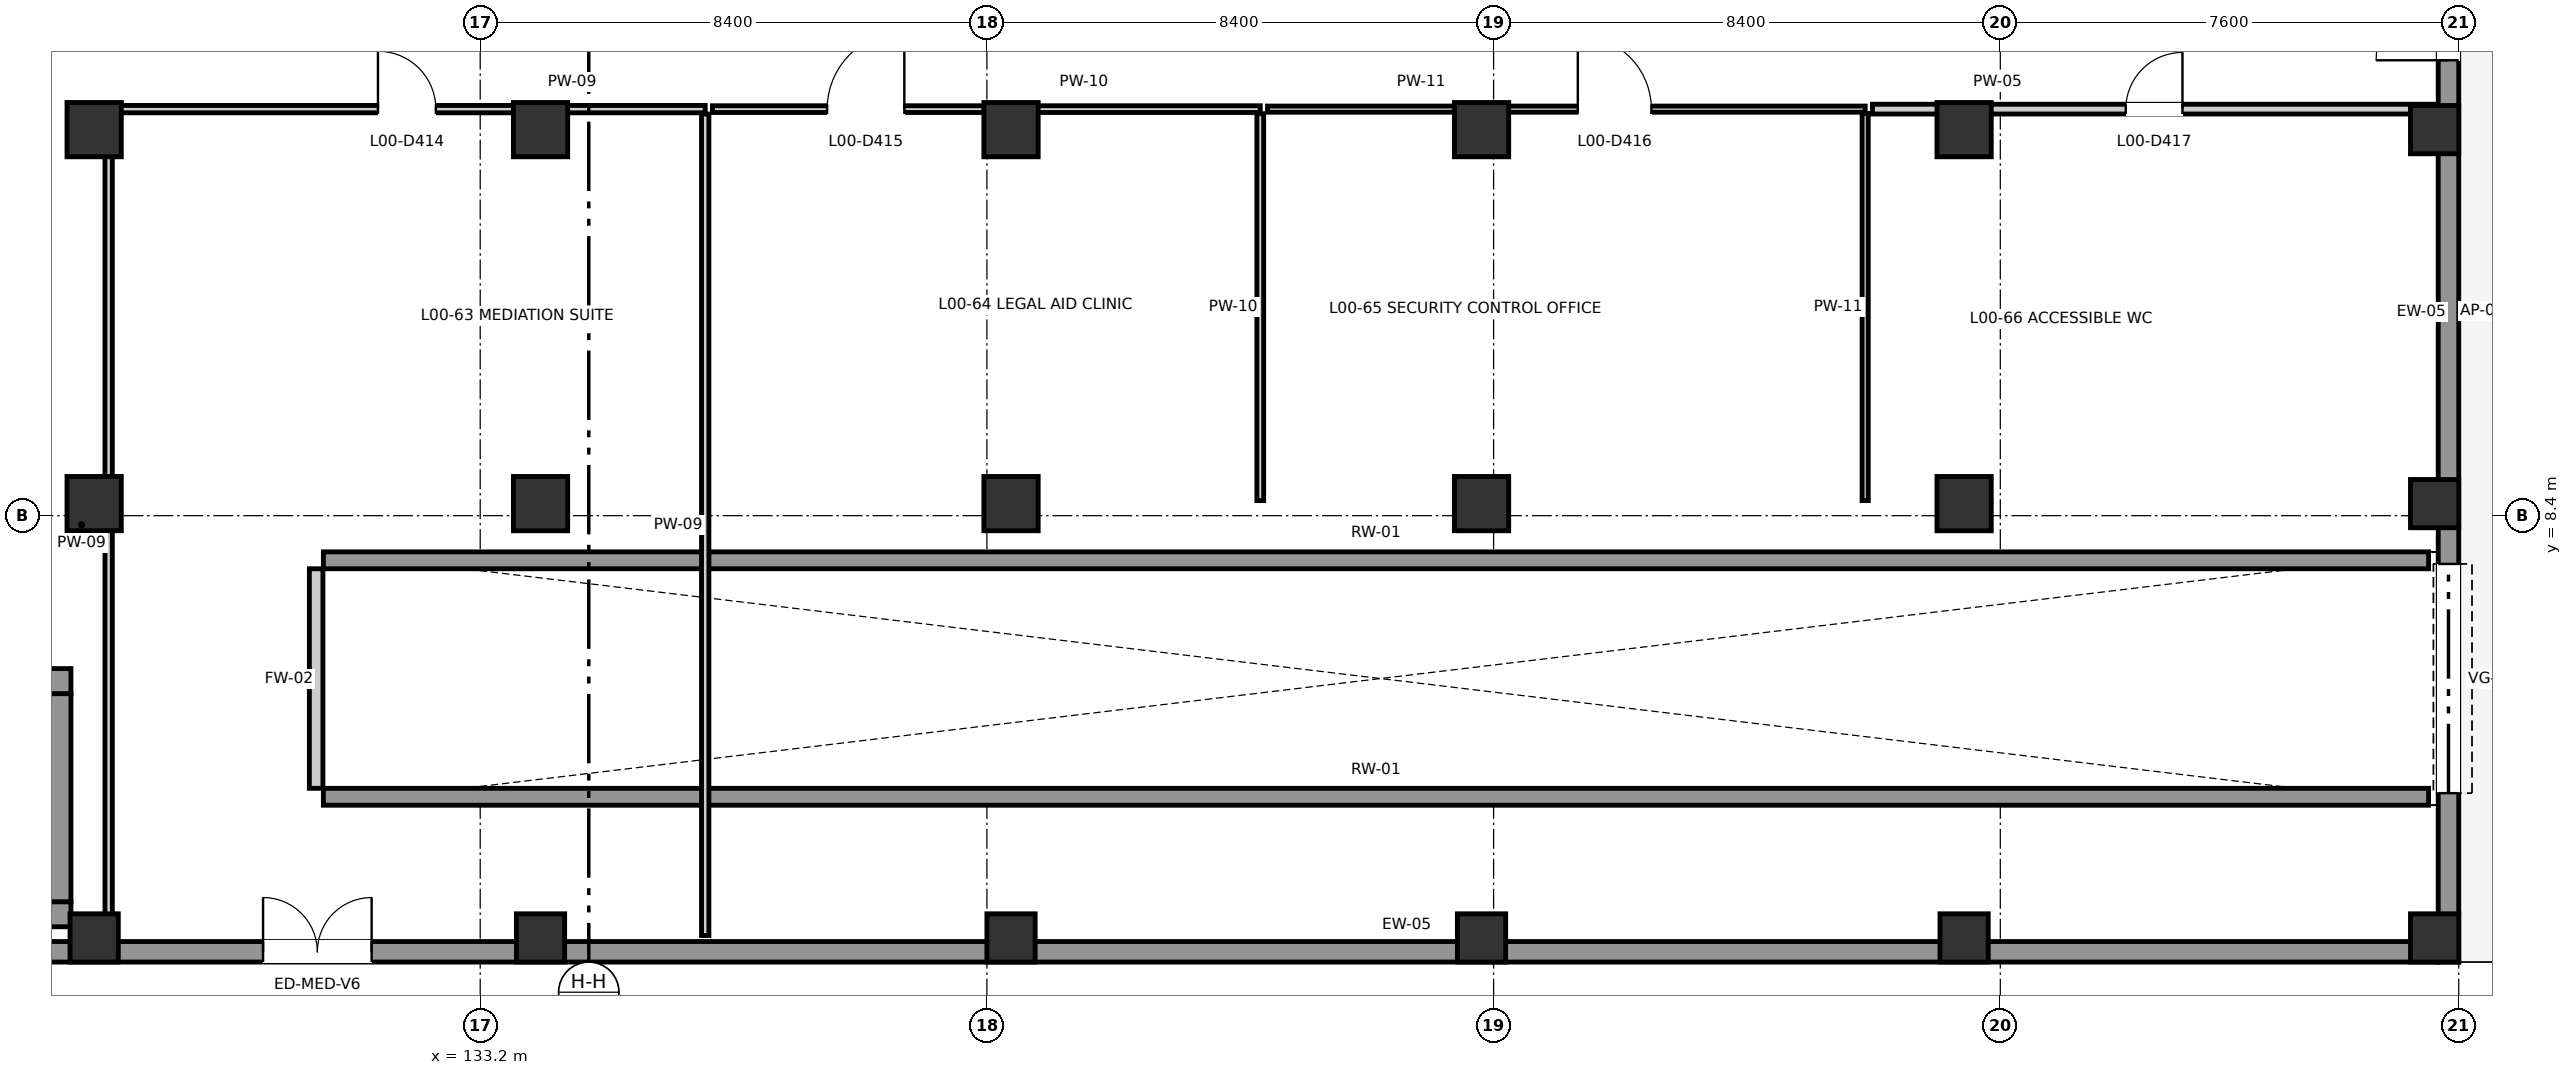
"""IFC4 building model, lengths in metres.
Left out: names, types, materials, properties, quantities, classifications, styles, units other than length and angle.
Written with IfcOpenShell. Run it as: python <this file> out.ifc"""

import sys

from ifc_helpers import new_model, si_unit, direction, frame, frame_2d, origin, origin_2d, place, context, subcontext, project, spatial, rectangle, extrude, element, fill, save


model = new_model("IFC4")
c1 = context("Model", 3, precision=1e-05, world=origin(), true_north=direction((0.0, 1.0)))
c2 = subcontext(c1, "Body", "Model", "MODEL_VIEW")
j1 = project(units=[si_unit("LENGTHUNIT", "METRE"), si_unit("PLANEANGLEUNIT", "RADIAN")], contexts=[c1])
p1 = place(None, origin())
s1 = spatial("IfcSite", under=j1, at=p1, CompositionType="ELEMENT")
p2 = place(p1, origin())
s2 = spatial("IfcBuilding", under=s1, at=p2, CompositionType="ELEMENT")
p3 = place(p2, origin())
s3 = spatial("IfcBuildingStorey", under=s2, at=p3, CompositionType="ELEMENT", Elevation=0.0)
p4 = place(p3, frame((126.8, 1.4, 0.0), z_axis=(0.0, 0.0, 1.0), x_axis=(1.0, 0.0, 0.0)))
e1 = element("IfcColumn", 1, at=p4, inside=s3, PredefinedType="COLUMN", context=c2, shape_type="SweptSolid", body=[
    extrude(rectangle(XDim=0.8, YDim=0.8, at=origin_2d()), origin(), (0.0, 0.0, 1.0), 5.4),
])
for number, where, z_axis, x_axis in (
    (2, (126.8, 8.6, 0.0), (0.0, 0.0, 1.0), (1.0, 0.0, 0.0)),
    (3, (126.8, 14.8, 0.0), (0.0, 0.0, 1.0), (1.0, 0.0, 0.0)),
):
    element("IfcColumn", number, at=place(p3, frame(where, z_axis=z_axis, x_axis=x_axis)), inside=s3, PredefinedType="COLUMN", context=c2, shape_type="SweptSolid", body=[
        extrude(rectangle(XDim=0.9, YDim=0.9, at=origin_2d()), origin(), (0.0, 0.0, 1.0), 5.4),
    ])
p5 = place(p3, frame((134.2, 1.4, 0.0), z_axis=(0.0, 0.0, 1.0), x_axis=(1.0, 0.0, 0.0)))
e4 = element("IfcColumn", 4, at=p5, inside=s3, PredefinedType="COLUMN", context=c2, shape_type="SweptSolid", body=[
    extrude(rectangle(XDim=0.8, YDim=0.8, at=origin_2d()), origin(), (0.0, 0.0, 1.0), 5.4),
])
for number, where, z_axis, x_axis in (
    (5, (134.2, 8.6, 0.0), (0.0, 0.0, 1.0), (1.0, 0.0, 0.0)),
    (6, (134.2, 14.8, 0.0), (0.0, 0.0, 1.0), (1.0, 0.0, 0.0)),
):
    element("IfcColumn", number, at=place(p3, frame(where, z_axis=z_axis, x_axis=x_axis)), inside=s3, PredefinedType="COLUMN", context=c2, shape_type="SweptSolid", body=[
        extrude(rectangle(XDim=0.9, YDim=0.9, at=origin_2d()), origin(), (0.0, 0.0, 1.0), 5.4),
    ])
p6 = place(p3, frame((142.0, 1.4, 0.0), z_axis=(0.0, 0.0, 1.0), x_axis=(1.0, 0.0, 0.0)))
e7 = element("IfcColumn", 7, at=p6, inside=s3, PredefinedType="COLUMN", context=c2, shape_type="SweptSolid", body=[
    extrude(rectangle(XDim=0.8, YDim=0.8, at=origin_2d()), origin(), (0.0, 0.0, 1.0), 5.4),
])
for number, where, z_axis, x_axis in (
    (8, (142.0, 8.6, 0.0), (0.0, 0.0, 1.0), (1.0, 0.0, 0.0)),
    (9, (142.0, 14.8, 0.0), (0.0, 0.0, 1.0), (1.0, 0.0, 0.0)),
):
    element("IfcColumn", number, at=place(p3, frame(where, z_axis=z_axis, x_axis=x_axis)), inside=s3, PredefinedType="COLUMN", context=c2, shape_type="SweptSolid", body=[
        extrude(rectangle(XDim=0.9, YDim=0.9, at=origin_2d()), origin(), (0.0, 0.0, 1.0), 5.4),
    ])
p7 = place(p3, frame((149.8, 1.4, 0.0), z_axis=(0.0, 0.0, 1.0), x_axis=(1.0, 0.0, 0.0)))
e10 = element("IfcColumn", 10, at=p7, inside=s3, PredefinedType="COLUMN", context=c2, shape_type="SweptSolid", body=[
    extrude(rectangle(XDim=0.8, YDim=0.8, at=origin_2d()), origin(), (0.0, 0.0, 1.0), 5.4),
])
for number, where, z_axis, x_axis in (
    (11, (149.8, 8.6, 0.0), (0.0, 0.0, 1.0), (1.0, 0.0, 0.0)),
    (12, (149.8, 14.8, 0.0), (0.0, 0.0, 1.0), (1.0, 0.0, 0.0)),
):
    element("IfcColumn", number, at=place(p3, frame(where, z_axis=z_axis, x_axis=x_axis)), inside=s3, PredefinedType="COLUMN", context=c2, shape_type="SweptSolid", body=[
        extrude(rectangle(XDim=0.9, YDim=0.9, at=origin_2d()), origin(), (0.0, 0.0, 1.0), 5.4),
    ])
p8 = place(p3, frame((157.8, 1.4, 0.0), z_axis=(0.0, 0.0, 1.0), x_axis=(1.0, 0.0, 0.0)))
e13 = element("IfcColumn", 13, at=p8, inside=s3, PredefinedType="COLUMN", context=c2, shape_type="SweptSolid", body=[
    extrude(rectangle(XDim=0.8, YDim=0.8, at=origin_2d()), origin(), (0.0, 0.0, 1.0), 5.4),
])
for number, where, z_axis, x_axis in (
    (14, (157.8, 8.6, 0.0), (0.0, 0.0, 1.0), (1.0, 0.0, 0.0)),
    (15, (157.8, 14.8, 0.0), (0.0, 0.0, 1.0), (1.0, 0.0, 0.0)),
):
    element("IfcColumn", number, at=place(p3, frame(where, z_axis=z_axis, x_axis=x_axis)), inside=s3, PredefinedType="COLUMN", context=c2, shape_type="SweptSolid", body=[
        extrude(rectangle(XDim=0.9, YDim=0.9, at=origin_2d()), origin(), (0.0, 0.0, 1.0), 5.4),
    ])
for number, where, z_axis, x_axis in (
    (16, (165.6, 1.4, 0.0), (0.0, 0.0, 1.0), (1.0, 0.0, 0.0)),
    (17, (165.6, 8.6, 0.0), (0.0, 0.0, 1.0), (1.0, 0.0, 0.0)),
    (18, (165.6, 14.8, 0.0), (0.0, 0.0, 1.0), (1.0, 0.0, 0.0)),
):
    element("IfcColumn", number, at=place(p3, frame(where, z_axis=z_axis, x_axis=x_axis)), inside=s3, PredefinedType="COLUMN", context=c2, shape_type="SweptSolid", body=[
        extrude(rectangle(XDim=0.8, YDim=0.8, at=origin_2d()), origin(), (0.0, 0.0, 1.0), 5.4),
    ])
p9 = place(p3, frame((101.755, 1.17, 0.0), z_axis=(0.0, 0.0, 1.0), x_axis=(1.0, 0.0, 0.0)))
e19 = element("IfcWall", 19, at=p9, inside=s3, PredefinedType="SOLIDWALL", context=c2, shape_type="SweptSolid", body=[
    extrude(rectangle(XDim=63.91, YDim=0.34, at=frame_2d((31.955, 0.0))), origin(), (0.0, 0.0, 1.0), 5.1),
])
p10 = place(p9, frame((3.245, 0.0, 0.0)))
e20 = element("IfcOpeningElement", 20, at=p10, cuts=e19, PredefinedType="OPENING", context=c2, shape_type="SweptSolid", body=[
    extrude(rectangle(XDim=1.6, YDim=2.26, at=frame_2d((0.8, 1.13))), frame((0.0, 0.185, 0.0), z_axis=(0.0, -1.0, 0.0), x_axis=(1.0, 0.0, 0.0)), (0.0, 0.0, 1.0), 0.37),
])
p11 = place(p9, frame((9.445, 0.0, 0.0)))
e21 = element("IfcOpeningElement", 21, at=p11, cuts=e19, PredefinedType="OPENING", context=c2, shape_type="SweptSolid", body=[
    extrude(rectangle(XDim=1.8, YDim=2.38, at=frame_2d((0.9, 1.19))), frame((0.0, 0.185, 0.0), z_axis=(0.0, -1.0, 0.0), x_axis=(1.0, 0.0, 0.0)), (0.0, 0.0, 1.0), 0.37),
])
p12 = place(p9, frame((13.695, 0.0, 0.0)))
e22 = element("IfcOpeningElement", 22, at=p12, cuts=e19, PredefinedType="OPENING", context=c2, shape_type="SweptSolid", body=[
    extrude(rectangle(XDim=1.2, YDim=2.2, at=frame_2d((0.6, 1.1))), frame((0.0, 0.185, 0.0), z_axis=(0.0, -1.0, 0.0), x_axis=(1.0, 0.0, 0.0)), (0.0, 0.0, 1.0), 0.37),
])
p13 = place(p9, frame((27.845, 0.0, 0.0)))
e23 = element("IfcOpeningElement", 23, at=p13, cuts=e19, PredefinedType="OPENING", context=c2, shape_type="SweptSolid", body=[
    extrude(rectangle(XDim=1.8, YDim=2.38, at=frame_2d((0.9, 1.19))), frame((0.0, 0.185, 0.0), z_axis=(0.0, -1.0, 0.0), x_axis=(1.0, 0.0, 0.0)), (0.0, 0.0, 1.0), 0.37),
])
p14 = place(p3, frame((165.83, 1.0, 0.0), z_axis=(0.0, 0.0, 1.0), x_axis=(0.0, 1.0, 0.0)))
e24 = element("IfcWall", 24, at=p14, inside=s3, PredefinedType="SOLIDWALL", context=c2, shape_type="SweptSolid", body=[
    extrude(rectangle(XDim=21.6, YDim=0.34, at=frame_2d((10.8, 0.0))), origin(), (0.0, 0.0, 1.0), 5.1),
])
p15 = place(p14, frame((16.8, 0.0, 0.0)))
e25 = element("IfcOpeningElement", 25, at=p15, cuts=e24, PredefinedType="OPENING", context=c2, shape_type="SweptSolid", body=[
    extrude(rectangle(XDim=3.6, YDim=3.0, at=frame_2d((1.8, 1.5))), frame((0.0, 0.185, 0.0), z_axis=(0.0, -1.0, 0.0), x_axis=(1.0, 0.0, 0.0)), (0.0, 0.0, 1.0), 0.37),
])
p16 = place(p14, frame((2.8, 0.0, 0.0)))
e26 = element("IfcOpeningElement", 26, at=p16, cuts=e24, PredefinedType="OPENING", context=c2, shape_type="SweptSolid", body=[
    extrude(rectangle(XDim=3.8, YDim=3.6, at=frame_2d((1.9, 1.8))), frame((0.0, 0.185, 0.0), z_axis=(0.0, -1.0, 0.0), x_axis=(1.0, 0.0, 0.0)), (0.0, 0.0, 1.0), 0.37),
])
p17 = place(p14, frame((14.95, 0.0, 0.0)))
e27 = element("IfcOpeningElement", 27, at=p17, cuts=e24, PredefinedType="OPENING", context=c2, shape_type="SweptSolid", body=[
    extrude(rectangle(XDim=1.2, YDim=2.2, at=frame_2d((0.6, 1.1))), frame((0.0, 0.185, 0.0), z_axis=(0.0, -1.0, 0.0), x_axis=(1.0, 0.0, 0.0)), (0.0, 0.0, 1.0), 0.37),
])
p18 = place(p3, frame((117.985, 1.792, 0.0), z_axis=(0.0, 0.0, 1.0), x_axis=(1.0, 0.0, 0.0)))
e28 = element("IfcWall", 28, at=p18, inside=s3, PredefinedType="SHEAR", context=c2, shape_type="SweptSolid", body=[
    extrude(rectangle(XDim=8.43, YDim=0.415, at=frame_2d((4.215, 0.0))), origin(), (0.0, 0.0, 1.0), 5.4),
])
p19 = place(p3, frame((126.208, 2.0, 0.0), z_axis=(0.0, 0.0, 1.0), x_axis=(0.0, 1.0, 0.0)))
e29 = element("IfcWall", 29, at=p19, inside=s3, PredefinedType="SHEAR", context=c2, shape_type="SweptSolid", body=[
    extrude(rectangle(XDim=3.45, YDim=0.415, at=frame_2d((1.725, 0.0))), origin(), (0.0, 0.0, 1.0), 5.4),
])
p20 = place(p3, frame((126.415, 5.657, 0.0), z_axis=(0.0, 0.0, 1.0), x_axis=(-1.0, 0.0, 0.0)))
e30 = element("IfcWall", 30, at=p20, inside=s3, PredefinedType="SHEAR", context=c2, shape_type="SweptSolid", body=[
    extrude(rectangle(XDim=8.43, YDim=0.415, at=frame_2d((4.215, 0.0))), origin(), (0.0, 0.0, 1.0), 5.4),
])
p21 = place(p20, frame((6.715, 0.0, 0.0)))
e31 = element("IfcOpeningElement", 31, at=p21, cuts=e30, PredefinedType="OPENING", context=c2, shape_type="SweptSolid", body=[
    extrude(rectangle(XDim=1.1, YDim=2.15, at=frame_2d((0.55, 1.075))), frame((0.0, 0.222, 0.0), z_axis=(0.0, -1.0, 0.0), x_axis=(1.0, 0.0, 0.0)), (0.0, 0.0, 1.0), 0.445),
])
for number, where, z_axis, x_axis in (
    (32, (130.6, 3.74, 0.0), (0.0, 0.0, 1.0), (1.0, 0.0, 0.0)),
    (33, (130.6, 7.66, 0.0), (0.0, 0.0, 1.0), (1.0, 0.0, 0.0)),
):
    element("IfcWall", number, at=place(p3, frame(where, z_axis=z_axis, x_axis=x_axis)), inside=s3, PredefinedType="SOLIDWALL", context=c2, shape_type="SweptSolid", body=[
        extrude(rectangle(XDim=34.9, YDim=0.28, at=frame_2d((17.45, 0.0))), origin(), (0.0, 0.0, 1.0), 5.4),
    ])
p22 = place(p3, frame((130.48, 3.88, 0.0), z_axis=(0.0, 0.0, 1.0), x_axis=(0.0, 1.0, 0.0)))
e34 = element("IfcWall", 34, at=p22, inside=s3, PredefinedType="PARTITIONING", context=c2, shape_type="SweptSolid", body=[
    extrude(rectangle(XDim=3.64, YDim=0.225, at=frame_2d((1.82, 0.0))), origin(), (0.0, 0.0, 1.0), 1.25),
])
p23 = place(p3, frame((127.04, 15.14, 0.0), z_axis=(0.0, 0.0, 1.0), x_axis=(1.0, 0.0, 0.0)))
e35 = element("IfcWall", 35, at=p23, inside=s3, PredefinedType="PARTITIONING", context=c2, shape_type="SweptSolid", body=[
    extrude(rectangle(XDim=9.89, YDim=0.122, at=frame_2d((4.945, 0.0))), origin(), (0.0, 0.0, 1.0), 4.48),
])
p24 = place(p23, frame((4.465, 0.0, 0.0)))
e36 = element("IfcOpeningElement", 36, at=p24, cuts=e35, PredefinedType="OPENING", context=c2, shape_type="SweptSolid", body=[
    extrude(rectangle(XDim=0.96, YDim=2.08, at=frame_2d((0.48, 1.04))), frame((0.0, 0.076, 0.0), z_axis=(0.0, -1.0, 0.0), x_axis=(1.0, 0.0, 0.0)), (0.0, 0.0, 1.0), 0.152),
])
p25 = place(p3, frame((127.04, 1.44, 0.0), z_axis=(0.0, 0.0, 1.0), x_axis=(0.0, 1.0, 0.0)))
e37 = element("IfcWall", 37, at=p25, inside=s3, PredefinedType="PARTITIONING", context=c2, shape_type="SweptSolid", body=[
    extrude(rectangle(XDim=13.619, YDim=0.122, at=frame_2d((6.81, 0.0))), origin(), (0.0, 0.0, 1.0), 4.33),
])
p26 = place(p3, frame((136.93, 1.44, 0.0), z_axis=(0.0, 0.0, 1.0), x_axis=(0.0, 1.0, 0.0)))
e38 = element("IfcWall", 38, at=p26, inside=s3, PredefinedType="PARTITIONING", context=c2, shape_type="SweptSolid", body=[
    extrude(rectangle(XDim=13.619, YDim=0.122, at=frame_2d((6.81, 0.0))), origin(), (0.0, 0.0, 1.0), 5.1),
])
p27 = place(p3, frame((137.05, 15.14, 0.0), z_axis=(0.0, 0.0, 1.0), x_axis=(1.0, 0.0, 0.0)))
e39 = element("IfcWall", 39, at=p27, inside=s3, PredefinedType="PARTITIONING", context=c2, shape_type="SweptSolid", body=[
    extrude(rectangle(XDim=9.082, YDim=0.112, at=frame_2d((4.541, 0.0))), origin(), (0.0, 0.0, 1.0), 4.48),
])
p28 = place(p27, frame((1.901, 0.0, 0.0)))
e40 = element("IfcOpeningElement", 40, at=p28, cuts=e39, PredefinedType="OPENING", context=c2, shape_type="SweptSolid", body=[
    extrude(rectangle(XDim=1.28, YDim=2.18, at=frame_2d((0.64, 1.09))), frame((0.0, 0.071, 0.0), z_axis=(0.0, -1.0, 0.0), x_axis=(1.0, 0.0, 0.0)), (0.0, 0.0, 1.0), 0.142),
])
p29 = place(p3, frame((146.132, 8.65, 0.0), z_axis=(0.0, 0.0, 1.0), x_axis=(0.0, 1.0, 0.0)))
e41 = element("IfcWall", 41, at=p29, inside=s3, PredefinedType="PARTITIONING", context=c2, shape_type="SweptSolid", body=[
    extrude(rectangle(XDim=6.414, YDim=0.112, at=frame_2d((3.207, 0.0))), origin(), (0.0, 0.0, 1.0), 5.1),
])
p30 = place(p3, frame((146.252, 15.14, 0.0), z_axis=(0.0, 0.0, 1.0), x_axis=(1.0, 0.0, 0.0)))
e42 = element("IfcWall", 42, at=p30, inside=s3, PredefinedType="PARTITIONING", context=c2, shape_type="SweptSolid", body=[
    extrude(rectangle(XDim=9.908, YDim=0.102, at=frame_2d((4.954, 0.0))), origin(), (0.0, 0.0, 1.0), 4.33),
])
p31 = place(p30, frame((5.144, 0.0, 0.0)))
e43 = element("IfcOpeningElement", 43, at=p31, cuts=e42, PredefinedType="OPENING", context=c2, shape_type="SweptSolid", body=[
    extrude(rectangle(XDim=1.22, YDim=2.18, at=frame_2d((0.61, 1.09))), frame((0.0, 0.066, 0.0), z_axis=(0.0, -1.0, 0.0), x_axis=(1.0, 0.0, 0.0)), (0.0, 0.0, 1.0), 0.132),
])
p32 = place(p3, frame((156.16, 8.65, 0.0), z_axis=(0.0, 0.0, 1.0), x_axis=(0.0, 1.0, 0.0)))
e44 = element("IfcWall", 44, at=p32, inside=s3, PredefinedType="PARTITIONING", context=c2, shape_type="SweptSolid", body=[
    extrude(rectangle(XDim=6.419, YDim=0.102, at=frame_2d((3.209, 0.0))), origin(), (0.0, 0.0, 1.0), 5.1),
])
p33 = place(p3, frame((156.28, 15.14, 0.0), z_axis=(0.0, 0.0, 1.0), x_axis=(1.0, 0.0, 0.0)))
e45 = element("IfcWall", 45, at=p33, inside=s3, PredefinedType="PARTITIONING", context=c2, shape_type="SweptSolid", body=[
    extrude(rectangle(XDim=9.34, YDim=0.162, at=frame_2d((4.67, 0.0))), origin(), (0.0, 0.0, 1.0), 4.33),
])
p34 = place(p33, frame((4.2, 0.0, 0.0)))
e46 = element("IfcOpeningElement", 46, at=p34, cuts=e45, PredefinedType="OPENING", context=c2, shape_type="SweptSolid", body=[
    extrude(rectangle(XDim=0.94, YDim=2.07, at=frame_2d((0.47, 1.035))), frame((0.0, 0.096, 0.0), z_axis=(0.0, -1.0, 0.0), x_axis=(1.0, 0.0, 0.0)), (0.0, 0.0, 1.0), 0.192),
])
p35 = place(p13, frame((1.8, 0.0, 0.0), z_axis=(0.0, 0.0, 1.0), x_axis=(-1.0, 0.0, 0.0)))
e47 = element("IfcDoor", 47, at=p35, inside=s3, OperationType="DOUBLE_DOOR_SINGLE_SWING", PredefinedType="DOOR", context=c2, shape_type="SweptSolid", body=[
    extrude(rectangle(XDim=1.8, YDim=2.38, at=frame_2d((0.9, 1.19))), frame((0.0, 0.025, 0.0), z_axis=(0.0, -1.0, 0.0), x_axis=(1.0, 0.0, 0.0)), (0.0, 0.0, 1.0), 0.05),
])
fill(e23, e47)
p36 = place(p16, frame((3.8, 0.0, 0.0), z_axis=(0.0, 0.0, 1.0), x_axis=(-1.0, 0.0, 0.0)))
e48 = element("IfcDoor", 48, at=p36, inside=s3, OperationType="ROLLINGUP", PredefinedType="DOOR", context=c2, shape_type="SweptSolid", body=[
    extrude(rectangle(XDim=3.8, YDim=3.6, at=frame_2d((1.9, 1.8))), frame((0.0, 0.025, 0.0), z_axis=(0.0, -1.0, 0.0), x_axis=(1.0, 0.0, 0.0)), (0.0, 0.0, 1.0), 0.05),
])
fill(e26, e48)
p37 = place(p17, frame((1.2, 0.0, 0.0), z_axis=(0.0, 0.0, 1.0), x_axis=(-1.0, 0.0, 0.0)))
e49 = element("IfcDoor", 49, at=p37, inside=s3, OperationType="SINGLE_SWING_LEFT", PredefinedType="DOOR", context=c2, shape_type="SweptSolid", body=[
    extrude(rectangle(XDim=1.2, YDim=2.2, at=frame_2d((0.6, 1.1))), frame((0.0, 0.025, 0.0), z_axis=(0.0, -1.0, 0.0), x_axis=(1.0, 0.0, 0.0)), (0.0, 0.0, 1.0), 0.05),
])
fill(e27, e49)
p38 = place(p24, frame((0.96, 0.0, 0.0), z_axis=(0.0, 0.0, 1.0), x_axis=(-1.0, 0.0, 0.0)))
e50 = element("IfcDoor", 50, at=p38, inside=s3, OperationType="SINGLE_SWING_LEFT", PredefinedType="DOOR", context=c2, shape_type="SweptSolid", body=[
    extrude(rectangle(XDim=0.96, YDim=2.08, at=frame_2d((0.48, 1.04))), frame((0.0, 0.025, 0.0), z_axis=(0.0, -1.0, 0.0), x_axis=(1.0, 0.0, 0.0)), (0.0, 0.0, 1.0), 0.05),
])
fill(e36, e50)
p39 = place(p28, frame((1.28, 0.0, 0.0), z_axis=(0.0, 0.0, 1.0), x_axis=(-1.0, 0.0, 0.0)))
e51 = element("IfcDoor", 51, at=p39, inside=s3, OperationType="SINGLE_SWING_RIGHT", PredefinedType="DOOR", context=c2, shape_type="SweptSolid", body=[
    extrude(rectangle(XDim=1.28, YDim=2.18, at=frame_2d((0.64, 1.09))), frame((0.0, 0.025, 0.0), z_axis=(0.0, -1.0, 0.0), x_axis=(1.0, 0.0, 0.0)), (0.0, 0.0, 1.0), 0.05),
])
fill(e40, e51)
p40 = place(p31, frame((1.22, 0.0, 0.0), z_axis=(0.0, 0.0, 1.0), x_axis=(-1.0, 0.0, 0.0)))
e52 = element("IfcDoor", 52, at=p40, inside=s3, OperationType="SINGLE_SWING_LEFT", PredefinedType="DOOR", context=c2, shape_type="SweptSolid", body=[
    extrude(rectangle(XDim=1.22, YDim=2.18, at=frame_2d((0.61, 1.09))), frame((0.0, 0.025, 0.0), z_axis=(0.0, -1.0, 0.0), x_axis=(1.0, 0.0, 0.0)), (0.0, 0.0, 1.0), 0.05),
])
fill(e43, e52)
p41 = place(p34, frame((0.94, 0.0, 0.0), z_axis=(0.0, 0.0, 1.0), x_axis=(-1.0, 0.0, 0.0)))
e53 = element("IfcDoor", 53, at=p41, inside=s3, OperationType="SINGLE_SWING_RIGHT", PredefinedType="DOOR", context=c2, shape_type="SweptSolid", body=[
    extrude(rectangle(XDim=0.94, YDim=2.07, at=frame_2d((0.47, 1.035))), frame((0.0, 0.025, 0.0), z_axis=(0.0, -1.0, 0.0), x_axis=(1.0, 0.0, 0.0)), (0.0, 0.0, 1.0), 0.05),
])
fill(e46, e53)
save(model, sys.argv[1])
